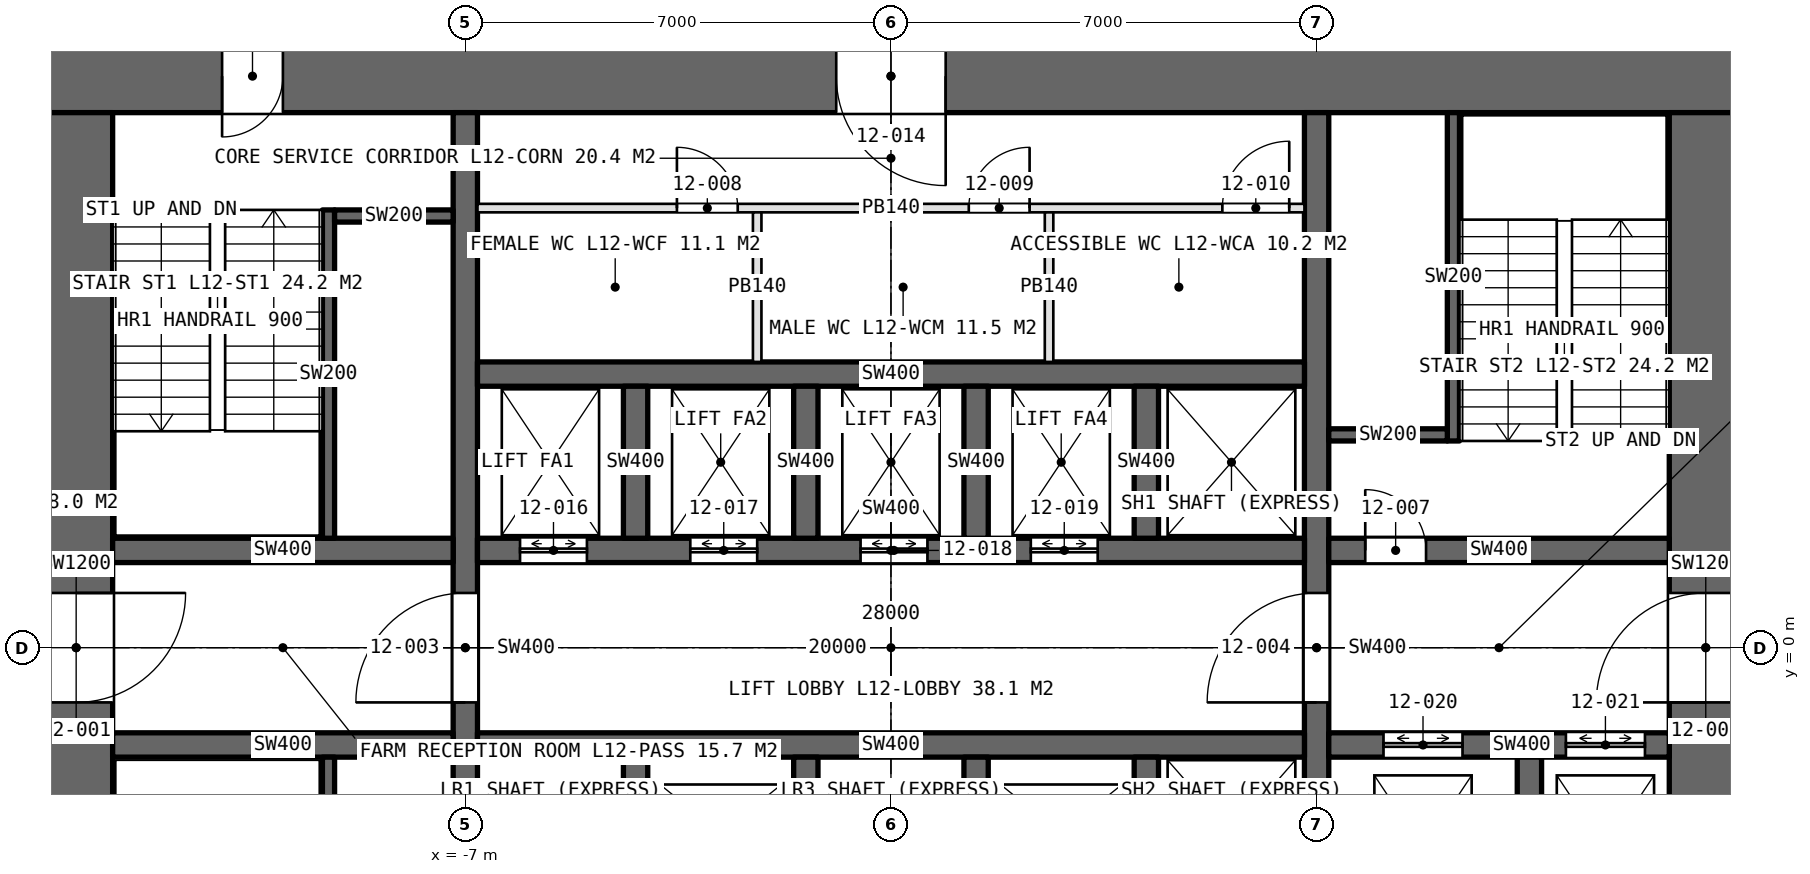
"""IFC4 building model, lengths in metres.
Left out: names, types, materials, properties, quantities, classifications, styles, units other than length and angle.
Written with IfcOpenShell. Run it as: python <this file> out.ifc"""

import sys

from ifc_helpers import new_model, si_unit, direction, frame, frame_2d, origin, place, context, subcontext, project, spatial, rectangle, extrude, element, fill, save


model = new_model("IFC4")
c1 = context("Model", 3, precision=1e-05, world=origin(), true_north=direction((0.0, 1.0)))
c2 = subcontext(c1, "Body", "Model", "MODEL_VIEW")
j1 = project(units=[si_unit("LENGTHUNIT", "METRE"), si_unit("PLANEANGLEUNIT", "RADIAN")], contexts=[c1])
p1 = place(None, origin())
s1 = spatial("IfcSite", under=j1, at=p1, CompositionType="ELEMENT")
p2 = place(p1, origin())
s2 = spatial("IfcBuilding", under=s1, at=p2, CompositionType="ELEMENT")
p3 = place(p2, frame((0.0, 0.0, 60.0)))
s3 = spatial("IfcBuildingStorey", under=s2, at=p3, CompositionType="ELEMENT", Elevation=60.0)
p4 = place(p3, frame((14.0, 9.4, 0.0), z_axis=(0.0, 0.0, 1.0), x_axis=(-1.0, 0.0, 0.0)))
e1 = element("IfcWall", 1, at=p4, inside=s3, PredefinedType="SHEAR", context=c2, shape_type="SweptSolid", body=[
    extrude(rectangle(XDim=28.0, YDim=1.2, at=frame_2d((14.0, 0.0))), origin(), (0.0, 0.0, 1.0), 5.0),
])
p5 = place(p4, frame((24.0, 0.0, 0.0)))
e2 = element("IfcOpeningElement", 2, at=p5, cuts=e1, PredefinedType="OPENING", context=c2, shape_type="SweptSolid", body=[
    extrude(rectangle(XDim=1.0, YDim=2.4, at=frame_2d((0.5, 1.2))), frame((0.0, 0.61, 0.0), z_axis=(0.0, -1.0, 0.0), x_axis=(1.0, 0.0, 0.0)), (0.0, 0.0, 1.0), 1.22),
])
p6 = place(p4, frame((13.1, 0.0, 0.0)))
e3 = element("IfcOpeningElement", 3, at=p6, cuts=e1, PredefinedType="OPENING", context=c2, shape_type="SweptSolid", body=[
    extrude(rectangle(XDim=1.8, YDim=2.4, at=frame_2d((0.9, 1.2))), frame((0.0, 0.61, 0.0), z_axis=(0.0, -1.0, 0.0), x_axis=(1.0, 0.0, 0.0)), (0.0, 0.0, 1.0), 1.22),
])
p7 = place(p3, frame((-13.4, 8.8, 0.0), z_axis=(0.0, 0.0, 1.0), x_axis=(0.0, -1.0, 0.0)))
e4 = element("IfcWall", 4, at=p7, inside=s3, PredefinedType="SHEAR", context=c2, shape_type="SweptSolid", body=[
    extrude(rectangle(XDim=17.6, YDim=1.2, at=frame_2d((8.8, 0.0))), origin(), (0.0, 0.0, 1.0), 5.0),
])
p8 = place(p7, frame((7.9, 0.0, 0.0)))
e5 = element("IfcOpeningElement", 5, at=p8, cuts=e4, PredefinedType="OPENING", context=c2, shape_type="SweptSolid", body=[
    extrude(rectangle(XDim=1.8, YDim=2.4, at=frame_2d((0.9, 1.2))), frame((0.0, 0.61, 0.0), z_axis=(0.0, -1.0, 0.0), x_axis=(1.0, 0.0, 0.0)), (0.0, 0.0, 1.0), 1.22),
])
p9 = place(p7, frame((16.5, 0.0, 0.0)))
e6 = element("IfcOpeningElement", 6, at=p9, cuts=e4, PredefinedType="OPENING", context=c2, shape_type="SweptSolid", body=[
    extrude(rectangle(XDim=1.0, YDim=2.4, at=frame_2d((0.5, 1.2))), frame((0.0, 0.61, 0.0), z_axis=(0.0, -1.0, 0.0), x_axis=(1.0, 0.0, 0.0)), (0.0, 0.0, 1.0), 1.22),
])
p10 = place(p3, frame((13.4, -8.8, 0.0), z_axis=(0.0, 0.0, 1.0), x_axis=(0.0, 1.0, 0.0)))
e7 = element("IfcWall", 7, at=p10, inside=s3, PredefinedType="SHEAR", context=c2, shape_type="SweptSolid", body=[
    extrude(rectangle(XDim=17.6, YDim=1.2, at=frame_2d((8.8, 0.0))), origin(), (0.0, 0.0, 1.0), 5.0),
])
p11 = place(p10, frame((7.9, 0.0, 0.0)))
e8 = element("IfcOpeningElement", 8, at=p11, cuts=e7, PredefinedType="OPENING", context=c2, shape_type="SweptSolid", body=[
    extrude(rectangle(XDim=1.8, YDim=2.4, at=frame_2d((0.9, 1.2))), frame((0.0, 0.61, 0.0), z_axis=(0.0, -1.0, 0.0), x_axis=(1.0, 0.0, 0.0)), (0.0, 0.0, 1.0), 1.22),
])
p12 = place(p3, frame((-7.0, -8.8, 0.0), z_axis=(0.0, 0.0, 1.0), x_axis=(0.0, 1.0, 0.0)))
e9 = element("IfcWall", 9, at=p12, inside=s3, PredefinedType="SHEAR", context=c2, shape_type="SweptSolid", body=[
    extrude(rectangle(XDim=17.6, YDim=0.4, at=frame_2d((8.8, 0.0))), origin(), (0.0, 0.0, 1.0), 5.0),
])
p13 = place(p12, frame((7.9, 0.0, 0.0)))
e10 = element("IfcOpeningElement", 10, at=p13, cuts=e9, PredefinedType="OPENING", context=c2, shape_type="SweptSolid", body=[
    extrude(rectangle(XDim=1.8, YDim=2.4, at=frame_2d((0.9, 1.2))), frame((0.0, 0.21, 0.0), z_axis=(0.0, -1.0, 0.0), x_axis=(1.0, 0.0, 0.0)), (0.0, 0.0, 1.0), 0.42),
])
p14 = place(p3, frame((7.0, -8.8, 0.0), z_axis=(0.0, 0.0, 1.0), x_axis=(0.0, 1.0, 0.0)))
e11 = element("IfcWall", 11, at=p14, inside=s3, PredefinedType="SHEAR", context=c2, shape_type="SweptSolid", body=[
    extrude(rectangle(XDim=17.6, YDim=0.4, at=frame_2d((8.8, 0.0))), origin(), (0.0, 0.0, 1.0), 5.0),
])
p15 = place(p14, frame((7.9, 0.0, 0.0)))
e12 = element("IfcOpeningElement", 12, at=p15, cuts=e11, PredefinedType="OPENING", context=c2, shape_type="SweptSolid", body=[
    extrude(rectangle(XDim=1.8, YDim=2.4, at=frame_2d((0.9, 1.2))), frame((0.0, 0.21, 0.0), z_axis=(0.0, -1.0, 0.0), x_axis=(1.0, 0.0, 0.0)), (0.0, 0.0, 1.0), 0.42),
])
p16 = place(p3, frame((-6.8, 1.6, 0.0), z_axis=(0.0, 0.0, 1.0), x_axis=(1.0, 0.0, 0.0)))
e13 = element("IfcWall", 13, at=p16, inside=s3, PredefinedType="SHEAR", context=c2, shape_type="SweptSolid", body=[
    extrude(rectangle(XDim=13.6, YDim=0.4, at=frame_2d((6.8, 0.0))), origin(), (0.0, 0.0, 1.0), 5.0),
])
p17 = place(p16, frame((0.7, 0.0, 0.0)))
e14 = element("IfcOpeningElement", 14, at=p17, cuts=e13, PredefinedType="OPENING", context=c2, shape_type="SweptSolid", body=[
    extrude(rectangle(XDim=1.1, YDim=2.4, at=frame_2d((0.55, 1.2))), frame((0.0, 0.21, 0.0), z_axis=(0.0, -1.0, 0.0), x_axis=(1.0, 0.0, 0.0)), (0.0, 0.0, 1.0), 0.42),
])
p18 = place(p16, frame((3.5, 0.0, 0.0)))
e15 = element("IfcOpeningElement", 15, at=p18, cuts=e13, PredefinedType="OPENING", context=c2, shape_type="SweptSolid", body=[
    extrude(rectangle(XDim=1.1, YDim=2.4, at=frame_2d((0.55, 1.2))), frame((0.0, 0.21, 0.0), z_axis=(0.0, -1.0, 0.0), x_axis=(1.0, 0.0, 0.0)), (0.0, 0.0, 1.0), 0.42),
])
p19 = place(p16, frame((6.3, 0.0, 0.0)))
e16 = element("IfcOpeningElement", 16, at=p19, cuts=e13, PredefinedType="OPENING", context=c2, shape_type="SweptSolid", body=[
    extrude(rectangle(XDim=1.1, YDim=2.4, at=frame_2d((0.55, 1.2))), frame((0.0, 0.21, 0.0), z_axis=(0.0, -1.0, 0.0), x_axis=(1.0, 0.0, 0.0)), (0.0, 0.0, 1.0), 0.42),
])
p20 = place(p16, frame((9.1, 0.0, 0.0)))
e17 = element("IfcOpeningElement", 17, at=p20, cuts=e13, PredefinedType="OPENING", context=c2, shape_type="SweptSolid", body=[
    extrude(rectangle(XDim=1.1, YDim=2.4, at=frame_2d((0.55, 1.2))), frame((0.0, 0.21, 0.0), z_axis=(0.0, -1.0, 0.0), x_axis=(1.0, 0.0, 0.0)), (0.0, 0.0, 1.0), 0.42),
])
for number, where, z_axis, x_axis in (
    (18, (-6.8, -1.6, 0.0), (0.0, 0.0, 1.0), (1.0, 0.0, 0.0)),
    (19, (-6.8, 4.5, 0.0), (0.0, 0.0, 1.0), (1.0, 0.0, 0.0)),
):
    element("IfcWall", number, at=place(p3, frame(where, z_axis=z_axis, x_axis=x_axis)), inside=s3, PredefinedType="SHEAR", context=c2, shape_type="SweptSolid", body=[
        extrude(rectangle(XDim=13.6, YDim=0.4, at=frame_2d((6.8, 0.0))), origin(), (0.0, 0.0, 1.0), 5.0),
    ])
for number, where, z_axis, x_axis in (
    (20, (-12.8, 1.6, 0.0), (0.0, 0.0, 1.0), (1.0, 0.0, 0.0)),
    (21, (-12.8, -1.6, 0.0), (0.0, 0.0, 1.0), (1.0, 0.0, 0.0)),
):
    element("IfcWall", number, at=place(p3, frame(where, z_axis=z_axis, x_axis=x_axis)), inside=s3, PredefinedType="SHEAR", context=c2, shape_type="SweptSolid", body=[
        extrude(rectangle(XDim=5.6, YDim=0.4, at=frame_2d((2.8, 0.0))), origin(), (0.0, 0.0, 1.0), 5.0),
    ])
p21 = place(p3, frame((7.2, 1.6, 0.0), z_axis=(0.0, 0.0, 1.0), x_axis=(1.0, 0.0, 0.0)))
e22 = element("IfcWall", 22, at=p21, inside=s3, PredefinedType="SHEAR", context=c2, shape_type="SweptSolid", body=[
    extrude(rectangle(XDim=5.6, YDim=0.4, at=frame_2d((2.8, 0.0))), origin(), (0.0, 0.0, 1.0), 5.0),
])
p22 = place(p21, frame((0.6, 0.0, 0.0)))
e23 = element("IfcOpeningElement", 23, at=p22, cuts=e22, PredefinedType="OPENING", context=c2, shape_type="SweptSolid", body=[
    extrude(rectangle(XDim=1.0, YDim=2.4, at=frame_2d((0.5, 1.2))), frame((0.0, 0.21, 0.0), z_axis=(0.0, -1.0, 0.0), x_axis=(1.0, 0.0, 0.0)), (0.0, 0.0, 1.0), 0.42),
])
p23 = place(p3, frame((7.2, -1.6, 0.0), z_axis=(0.0, 0.0, 1.0), x_axis=(1.0, 0.0, 0.0)))
e24 = element("IfcWall", 24, at=p23, inside=s3, PredefinedType="SHEAR", context=c2, shape_type="SweptSolid", body=[
    extrude(rectangle(XDim=5.6, YDim=0.4, at=frame_2d((2.8, 0.0))), origin(), (0.0, 0.0, 1.0), 5.0),
])
p24 = place(p23, frame((0.9, 0.0, 0.0)))
e25 = element("IfcOpeningElement", 25, at=p24, cuts=e24, PredefinedType="OPENING", context=c2, shape_type="SweptSolid", body=[
    extrude(rectangle(XDim=1.3, YDim=2.4, at=frame_2d((0.65, 1.2))), frame((0.0, 0.21, 0.0), z_axis=(0.0, -1.0, 0.0), x_axis=(1.0, 0.0, 0.0)), (0.0, 0.0, 1.0), 0.42),
])
p25 = place(p23, frame((3.9, 0.0, 0.0)))
e26 = element("IfcOpeningElement", 26, at=p25, cuts=e24, PredefinedType="OPENING", context=c2, shape_type="SweptSolid", body=[
    extrude(rectangle(XDim=1.3, YDim=2.4, at=frame_2d((0.65, 1.2))), frame((0.0, 0.21, 0.0), z_axis=(0.0, -1.0, 0.0), x_axis=(1.0, 0.0, 0.0)), (0.0, 0.0, 1.0), 0.42),
])
p26 = place(p3, frame((10.5, -4.8, 0.0), z_axis=(0.0, 0.0, 1.0), x_axis=(0.0, 1.0, 0.0)))
e27 = element("IfcWall", 27, at=p26, inside=s3, PredefinedType="SHEAR", context=c2, shape_type="SweptSolid", body=[
    extrude(rectangle(XDim=3.0, YDim=0.4, at=frame_2d((1.5, 0.0))), origin(), (0.0, 0.0, 1.0), 5.0),
])
for number, where, z_axis, x_axis in (
    (28, (-4.2, 1.8, 0.0), (0.0, 0.0, 1.0), (0.0, 1.0, 0.0)),
    (29, (-4.2, -4.3, 0.0), (0.0, 0.0, 1.0), (0.0, 1.0, 0.0)),
    (30, (-1.4, 1.8, 0.0), (0.0, 0.0, 1.0), (0.0, 1.0, 0.0)),
    (31, (-1.4, -4.3, 0.0), (0.0, 0.0, 1.0), (0.0, 1.0, 0.0)),
    (32, (1.4, 1.8, 0.0), (0.0, 0.0, 1.0), (0.0, 1.0, 0.0)),
    (33, (1.4, -4.3, 0.0), (0.0, 0.0, 1.0), (0.0, 1.0, 0.0)),
    (34, (4.2, 1.8, 0.0), (0.0, 0.0, 1.0), (0.0, 1.0, 0.0)),
    (35, (4.2, -4.3, 0.0), (0.0, 0.0, 1.0), (0.0, 1.0, 0.0)),
):
    element("IfcWall", number, at=place(p3, frame(where, z_axis=z_axis, x_axis=x_axis)), inside=s3, PredefinedType="SHEAR", context=c2, shape_type="SweptSolid", body=[
        extrude(rectangle(XDim=2.5, YDim=0.4, at=frame_2d((1.25, 0.0))), origin(), (0.0, 0.0, 1.0), 5.0),
    ])
p27 = place(p3, frame((-6.8, 7.23, 0.0), z_axis=(0.0, 0.0, 1.0), x_axis=(1.0, 0.0, 0.0)))
e36 = element("IfcWall", 36, at=p27, inside=s3, PredefinedType="PARTITIONING", context=c2, shape_type="SweptSolid", body=[
    extrude(rectangle(XDim=13.6, YDim=0.14, at=frame_2d((6.8, 0.0))), origin(), (0.0, 0.0, 1.0), 4.75),
])
p28 = place(p27, frame((3.28, 0.0, 0.0)))
e37 = element("IfcOpeningElement", 37, at=p28, cuts=e36, PredefinedType="OPENING", context=c2, shape_type="SweptSolid", body=[
    extrude(rectangle(XDim=1.0, YDim=2.4, at=frame_2d((0.5, 1.2))), frame((0.0, 0.08, 0.0), z_axis=(0.0, -1.0, 0.0), x_axis=(1.0, 0.0, 0.0)), (0.0, 0.0, 1.0), 0.16),
])
p29 = place(p27, frame((8.08, 0.0, 0.0)))
e38 = element("IfcOpeningElement", 38, at=p29, cuts=e36, PredefinedType="OPENING", context=c2, shape_type="SweptSolid", body=[
    extrude(rectangle(XDim=1.0, YDim=2.4, at=frame_2d((0.5, 1.2))), frame((0.0, 0.08, 0.0), z_axis=(0.0, -1.0, 0.0), x_axis=(1.0, 0.0, 0.0)), (0.0, 0.0, 1.0), 0.16),
])
p30 = place(p27, frame((12.25, 0.0, 0.0)))
e39 = element("IfcOpeningElement", 39, at=p30, cuts=e36, PredefinedType="OPENING", context=c2, shape_type="SweptSolid", body=[
    extrude(rectangle(XDim=1.1, YDim=2.4, at=frame_2d((0.55, 1.2))), frame((0.0, 0.08, 0.0), z_axis=(0.0, -1.0, 0.0), x_axis=(1.0, 0.0, 0.0)), (0.0, 0.0, 1.0), 0.16),
])
for number, where, z_axis, x_axis in (
    (40, (-2.2, 4.7, 0.0), (0.0, 0.0, 1.0), (0.0, 1.0, 0.0)),
    (41, (2.6, 4.7, 0.0), (0.0, 0.0, 1.0), (0.0, 1.0, 0.0)),
):
    element("IfcWall", number, at=place(p3, frame(where, z_axis=z_axis, x_axis=x_axis)), inside=s3, PredefinedType="PARTITIONING", context=c2, shape_type="SweptSolid", body=[
        extrude(rectangle(XDim=2.46, YDim=0.14, at=frame_2d((1.23, 0.0))), origin(), (0.0, 0.0, 1.0), 4.75),
    ])
p31 = place(p3, frame((-9.25, 7.2, 0.0), z_axis=(0.0, 0.0, 1.0), x_axis=(0.0, -1.0, 0.0)))
e42 = element("IfcWall", 42, at=p31, inside=s3, PredefinedType="SOLIDWALL", context=c2, shape_type="SweptSolid", body=[
    extrude(rectangle(XDim=5.4, YDim=0.2, at=frame_2d((2.7, 0.0))), origin(), (0.0, 0.0, 1.0), 5.0),
])
p32 = place(p3, frame((-9.15, 7.1, 0.0), z_axis=(0.0, 0.0, 1.0), x_axis=(1.0, 0.0, 0.0)))
e43 = element("IfcWall", 43, at=p32, inside=s3, PredefinedType="SOLIDWALL", context=c2, shape_type="SweptSolid", body=[
    extrude(rectangle(XDim=1.95, YDim=0.2, at=frame_2d((0.975, 0.0))), origin(), (0.0, 0.0, 1.0), 5.0),
])
p33 = place(p3, frame((-9.25, -7.2, 0.0), z_axis=(0.0, 0.0, 1.0), x_axis=(0.0, 1.0, 0.0)))
e44 = element("IfcWall", 44, at=p33, inside=s3, PredefinedType="SOLIDWALL", context=c2, shape_type="SweptSolid", body=[
    extrude(rectangle(XDim=5.4, YDim=0.2, at=frame_2d((2.7, 0.0))), origin(), (0.0, 0.0, 1.0), 5.0),
])
p34 = place(p3, frame((9.25, 3.4, 0.0), z_axis=(0.0, 0.0, 1.0), x_axis=(0.0, 1.0, 0.0)))
e45 = element("IfcWall", 45, at=p34, inside=s3, PredefinedType="SOLIDWALL", context=c2, shape_type="SweptSolid", body=[
    extrude(rectangle(XDim=5.4, YDim=0.2, at=frame_2d((2.7, 0.0))), origin(), (0.0, 0.0, 1.0), 5.0),
])
p35 = place(p3, frame((9.15, 3.5, 0.0), z_axis=(0.0, 0.0, 1.0), x_axis=(-1.0, 0.0, 0.0)))
e46 = element("IfcWall", 46, at=p35, inside=s3, PredefinedType="SOLIDWALL", context=c2, shape_type="SweptSolid", body=[
    extrude(rectangle(XDim=1.95, YDim=0.2, at=frame_2d((0.975, 0.0))), origin(), (0.0, 0.0, 1.0), 5.0),
])
p36 = place(p8, origin())
e47 = element("IfcDoor", 47, at=p36, inside=s3, OperationType="DOUBLE_DOOR_SINGLE_SWING", PredefinedType="DOOR", context=c2, shape_type="SweptSolid", body=[
    extrude(rectangle(XDim=1.8, YDim=2.4, at=frame_2d((0.9, 1.2))), frame((0.0, 0.025, 0.0), z_axis=(0.0, -1.0, 0.0), x_axis=(1.0, 0.0, 0.0)), (0.0, 0.0, 1.0), 0.05),
])
fill(e5, e47)
p37 = place(p11, origin())
e48 = element("IfcDoor", 48, at=p37, inside=s3, OperationType="DOUBLE_DOOR_SINGLE_SWING", PredefinedType="DOOR", context=c2, shape_type="SweptSolid", body=[
    extrude(rectangle(XDim=1.8, YDim=2.4, at=frame_2d((0.9, 1.2))), frame((0.0, 0.025, 0.0), z_axis=(0.0, -1.0, 0.0), x_axis=(1.0, 0.0, 0.0)), (0.0, 0.0, 1.0), 0.05),
])
fill(e8, e48)
p38 = place(p13, origin())
e49 = element("IfcDoor", 49, at=p38, inside=s3, OperationType="DOUBLE_DOOR_SINGLE_SWING", PredefinedType="DOOR", context=c2, shape_type="SweptSolid", body=[
    extrude(rectangle(XDim=1.8, YDim=2.4, at=frame_2d((0.9, 1.2))), frame((0.0, 0.025, 0.0), z_axis=(0.0, -1.0, 0.0), x_axis=(1.0, 0.0, 0.0)), (0.0, 0.0, 1.0), 0.05),
])
fill(e10, e49)
p39 = place(p15, origin())
e50 = element("IfcDoor", 50, at=p39, inside=s3, OperationType="DOUBLE_DOOR_SINGLE_SWING", PredefinedType="DOOR", context=c2, shape_type="SweptSolid", body=[
    extrude(rectangle(XDim=1.8, YDim=2.4, at=frame_2d((0.9, 1.2))), frame((0.0, 0.025, 0.0), z_axis=(0.0, -1.0, 0.0), x_axis=(1.0, 0.0, 0.0)), (0.0, 0.0, 1.0), 0.05),
])
fill(e12, e50)
p40 = place(p5, origin())
e51 = element("IfcDoor", 51, at=p40, inside=s3, OperationType="SINGLE_SWING_RIGHT", PredefinedType="DOOR", context=c2, shape_type="SweptSolid", body=[
    extrude(rectangle(XDim=1.0, YDim=2.4, at=frame_2d((0.5, 1.2))), frame((0.0, 0.025, 0.0), z_axis=(0.0, -1.0, 0.0), x_axis=(1.0, 0.0, 0.0)), (0.0, 0.0, 1.0), 0.05),
])
fill(e2, e51)
p41 = place(p22, origin())
e52 = element("IfcDoor", 52, at=p41, inside=s3, OperationType="SINGLE_SWING_LEFT", PredefinedType="DOOR", context=c2, shape_type="SweptSolid", body=[
    extrude(rectangle(XDim=1.0, YDim=2.4, at=frame_2d((0.5, 1.2))), frame((0.0, 0.025, 0.0), z_axis=(0.0, -1.0, 0.0), x_axis=(1.0, 0.0, 0.0)), (0.0, 0.0, 1.0), 0.05),
])
fill(e23, e52)
p42 = place(p28, origin())
e53 = element("IfcDoor", 53, at=p42, inside=s3, OperationType="SINGLE_SWING_LEFT", PredefinedType="DOOR", context=c2, shape_type="SweptSolid", body=[
    extrude(rectangle(XDim=1.0, YDim=2.4, at=frame_2d((0.5, 1.2))), frame((0.0, 0.025, 0.0), z_axis=(0.0, -1.0, 0.0), x_axis=(1.0, 0.0, 0.0)), (0.0, 0.0, 1.0), 0.05),
])
fill(e37, e53)
p43 = place(p29, origin())
e54 = element("IfcDoor", 54, at=p43, inside=s3, OperationType="SINGLE_SWING_RIGHT", PredefinedType="DOOR", context=c2, shape_type="SweptSolid", body=[
    extrude(rectangle(XDim=1.0, YDim=2.4, at=frame_2d((0.5, 1.2))), frame((0.0, 0.025, 0.0), z_axis=(0.0, -1.0, 0.0), x_axis=(1.0, 0.0, 0.0)), (0.0, 0.0, 1.0), 0.05),
])
fill(e38, e54)
p44 = place(p30, origin())
e55 = element("IfcDoor", 55, at=p44, inside=s3, OperationType="SINGLE_SWING_RIGHT", PredefinedType="DOOR", context=c2, shape_type="SweptSolid", body=[
    extrude(rectangle(XDim=1.1, YDim=2.4, at=frame_2d((0.55, 1.2))), frame((0.0, 0.025, 0.0), z_axis=(0.0, -1.0, 0.0), x_axis=(1.0, 0.0, 0.0)), (0.0, 0.0, 1.0), 0.05),
])
fill(e39, e55)
p45 = place(p6, origin())
e56 = element("IfcDoor", 56, at=p45, inside=s3, OperationType="DOUBLE_DOOR_SINGLE_SWING", PredefinedType="DOOR", context=c2, shape_type="SweptSolid", body=[
    extrude(rectangle(XDim=1.8, YDim=2.4, at=frame_2d((0.9, 1.2))), frame((0.0, 0.025, 0.0), z_axis=(0.0, -1.0, 0.0), x_axis=(1.0, 0.0, 0.0)), (0.0, 0.0, 1.0), 0.05),
])
fill(e3, e56)
p46 = place(p17, origin())
e57 = element("IfcDoor", 57, at=p46, inside=s3, OperationType="DOUBLE_DOOR_SLIDING", PredefinedType="DOOR", context=c2, shape_type="SweptSolid", body=[
    extrude(rectangle(XDim=1.1, YDim=2.4, at=frame_2d((0.55, 1.2))), frame((0.0, 0.025, 0.0), z_axis=(0.0, -1.0, 0.0), x_axis=(1.0, 0.0, 0.0)), (0.0, 0.0, 1.0), 0.05),
])
fill(e14, e57)
p47 = place(p18, origin())
e58 = element("IfcDoor", 58, at=p47, inside=s3, OperationType="DOUBLE_DOOR_SLIDING", PredefinedType="DOOR", context=c2, shape_type="SweptSolid", body=[
    extrude(rectangle(XDim=1.1, YDim=2.4, at=frame_2d((0.55, 1.2))), frame((0.0, 0.025, 0.0), z_axis=(0.0, -1.0, 0.0), x_axis=(1.0, 0.0, 0.0)), (0.0, 0.0, 1.0), 0.05),
])
fill(e15, e58)
p48 = place(p19, origin())
e59 = element("IfcDoor", 59, at=p48, inside=s3, OperationType="DOUBLE_DOOR_SLIDING", PredefinedType="DOOR", context=c2, shape_type="SweptSolid", body=[
    extrude(rectangle(XDim=1.1, YDim=2.4, at=frame_2d((0.55, 1.2))), frame((0.0, 0.025, 0.0), z_axis=(0.0, -1.0, 0.0), x_axis=(1.0, 0.0, 0.0)), (0.0, 0.0, 1.0), 0.05),
])
fill(e16, e59)
p49 = place(p20, origin())
e60 = element("IfcDoor", 60, at=p49, inside=s3, OperationType="DOUBLE_DOOR_SLIDING", PredefinedType="DOOR", context=c2, shape_type="SweptSolid", body=[
    extrude(rectangle(XDim=1.1, YDim=2.4, at=frame_2d((0.55, 1.2))), frame((0.0, 0.025, 0.0), z_axis=(0.0, -1.0, 0.0), x_axis=(1.0, 0.0, 0.0)), (0.0, 0.0, 1.0), 0.05),
])
fill(e17, e60)
p50 = place(p24, origin())
e61 = element("IfcDoor", 61, at=p50, inside=s3, OperationType="DOUBLE_DOOR_SLIDING", PredefinedType="DOOR", context=c2, shape_type="SweptSolid", body=[
    extrude(rectangle(XDim=1.3, YDim=2.4, at=frame_2d((0.65, 1.2))), frame((0.0, 0.025, 0.0), z_axis=(0.0, -1.0, 0.0), x_axis=(1.0, 0.0, 0.0)), (0.0, 0.0, 1.0), 0.05),
])
fill(e25, e61)
p51 = place(p25, origin())
e62 = element("IfcDoor", 62, at=p51, inside=s3, OperationType="DOUBLE_DOOR_SLIDING", PredefinedType="DOOR", context=c2, shape_type="SweptSolid", body=[
    extrude(rectangle(XDim=1.3, YDim=2.4, at=frame_2d((0.65, 1.2))), frame((0.0, 0.025, 0.0), z_axis=(0.0, -1.0, 0.0), x_axis=(1.0, 0.0, 0.0)), (0.0, 0.0, 1.0), 0.05),
])
fill(e26, e62)
save(model, sys.argv[1])
